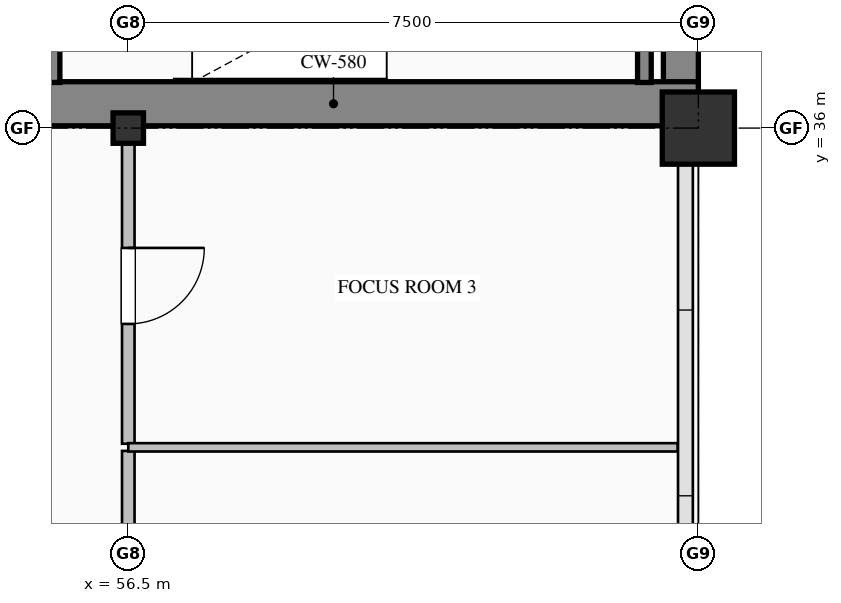
"""IFC4 building model, lengths in metres.
Left out: names, types, materials, properties, quantities, classifications, styles, units other than length and angle.
Written with IfcOpenShell. Run it as: python <this file> out.ifc"""

import sys

from ifc_helpers import new_model, si_unit, direction, frame, frame_2d, origin, origin_2d, place, context, subcontext, project, spatial, rectangle, hollow_rectangle, i_section, extrude, element, fill, save


model = new_model("IFC4")
c1 = context("Model", 3, precision=1e-05, world=origin(), true_north=direction((0.0, 1.0)))
c2 = subcontext(c1, "Body", "Model", "MODEL_VIEW")
j1 = project(units=[si_unit("LENGTHUNIT", "METRE"), si_unit("PLANEANGLEUNIT", "RADIAN")], contexts=[c1])
p1 = place(None, origin())
s1 = spatial("IfcSite", under=j1, at=p1, CompositionType="ELEMENT")
p2 = place(p1, origin())
s2 = spatial("IfcBuilding", under=s1, at=p2, CompositionType="ELEMENT")
p3 = place(p2, frame((0.0, 0.0, 213.8)))
s3 = spatial("IfcBuildingStorey", under=s2, at=p3, CompositionType="ELEMENT", Elevation=213.8)
p4 = place(p3, frame((63.77, 36.32, 0.0), z_axis=(0.0, 0.0, 1.0), x_axis=(0.0, 1.0, 0.0)))
e1 = element("IfcWall", 1, at=p4, inside=s3, PredefinedType="SHEAR", context=c2, shape_type="SweptSolid", body=[
    extrude(rectangle(XDim=15.22, YDim=0.46, at=frame_2d((7.61, 0.0))), origin(), (0.0, 0.0, 1.0), 3.775),
])
p5 = place(p3, frame((54.4, 36.32, 0.0), z_axis=(0.0, 0.0, 1.0), x_axis=(1.0, 0.0, 0.0)))
e2 = element("IfcWall", 2, at=p5, inside=s3, PredefinedType="SHEAR", context=c2, shape_type="SweptSolid", body=[
    extrude(rectangle(XDim=9.6, YDim=0.58, at=frame_2d((4.8, 0.0))), origin(), (0.0, 0.0, 1.0), 4.0),
])
p6 = place(p3, frame((56.5, 36.0, 0.0), z_axis=(0.0, 0.0, 1.0), x_axis=(1.0, 0.0, 0.0)))
e3 = element("IfcColumn", 3, at=p6, inside=s3, PredefinedType="COLUMN", context=c2, shape_type="SweptSolid", body=[
    extrude(i_section(OverallWidth=0.4, OverallDepth=0.4, WebThickness=0.013, FlangeThickness=0.021, FilletRadius=0.022, at=origin_2d()), origin(), (0.0, 0.0, 1.0), 4.0),
])
p7 = place(p3, frame((64.0, 36.0, 0.0), z_axis=(0.0, 0.0, 1.0), x_axis=(1.0, 0.0, 0.0)))
e4 = element("IfcColumn", 4, at=p7, inside=s3, PredefinedType="COLUMN", context=c2, shape_type="SweptSolid", body=[
    extrude(hollow_rectangle(XDim=0.95, YDim=0.95, WallThickness=0.036, at=origin_2d()), origin(), (0.0, 0.0, 1.0), 4.0),
])
p8 = place(p3, frame((55.48, 39.75, 0.0), z_axis=(0.0, 0.0, 1.0), x_axis=(0.0, -1.0, 0.0)))
e5 = element("IfcWall", 5, at=p8, inside=s3, PredefinedType="SOLIDWALL", context=c2, shape_type="SweptSolid", body=[
    extrude(rectangle(XDim=3.15, YDim=0.24, at=frame_2d((1.575, 0.0))), origin(), (0.0, 0.0, 1.0), 4.0),
])
p9 = place(p8, frame((1.0, 0.0, 0.0)))
e6 = element("IfcOpeningElement", 6, at=p9, cuts=e5, PredefinedType="OPENING", context=c2, shape_type="SweptSolid", body=[
    extrude(rectangle(XDim=1.15, YDim=2.2, at=frame_2d((0.575, 1.1))), frame((0.0, 0.13, 0.0), z_axis=(0.0, -1.0, 0.0), x_axis=(1.0, 0.0, 0.0)), (0.0, 0.0, 1.0), 0.26),
])
p10 = place(p3, frame((63.29, 36.6, 0.0), z_axis=(0.0, 0.0, 1.0), x_axis=(0.0, 1.0, 0.0)))
e7 = element("IfcWall", 7, at=p10, inside=s3, PredefinedType="SOLIDWALL", context=c2, shape_type="SweptSolid", body=[
    extrude(rectangle(XDim=3.15, YDim=0.18, at=frame_2d((1.575, 0.0))), origin(), (0.0, 0.0, 1.0), 4.0),
])
p11 = place(p3, frame((56.5, 31.753, 0.0), z_axis=(0.0, 0.0, 1.0), x_axis=(0.0, -1.0, 0.0)))
e8 = element("IfcWall", 8, at=p11, inside=s3, PredefinedType="PARTITIONING", context=c2, shape_type="SweptSolid", body=[
    extrude(rectangle(XDim=1.278, YDim=0.165, at=frame_2d((0.639, 0.0))), origin(), (0.0, 0.0, 1.0), 3.179),
])
p12 = place(p3, frame((56.5, 36.0, 0.0), z_axis=(0.0, 0.0, 1.0), x_axis=(0.0, -1.0, 0.0)))
e9 = element("IfcWall", 9, at=p12, inside=s3, PredefinedType="PARTITIONING", context=c2, shape_type="SweptSolid", body=[
    extrude(rectangle(XDim=4.153, YDim=0.165, at=frame_2d((2.077, 0.0))), origin(), (0.0, 0.0, 1.0), 3.179),
])
p13 = place(p12, frame((1.576, 0.0, 0.0)))
e10 = element("IfcOpeningElement", 10, at=p13, cuts=e9, PredefinedType="OPENING", context=c2, shape_type="SweptSolid", body=[
    extrude(rectangle(XDim=1.0, YDim=2.15, at=frame_2d((0.5, 1.075))), frame((0.0, 0.093, 0.0), z_axis=(0.0, -1.0, 0.0), x_axis=(1.0, 0.0, 0.0)), (0.0, 0.0, 1.0), 0.185),
])
p14 = place(p3, frame((56.5, 31.8, 0.0), z_axis=(0.0, 0.0, 1.0), x_axis=(1.0, 0.0, 0.0)))
e11 = element("IfcWall", 11, at=p14, inside=s3, PredefinedType="MOVABLE", context=c2, shape_type="SweptSolid", body=[
    extrude(rectangle(XDim=7.228, YDim=0.11, at=frame_2d((3.614, 0.0))), origin(), (0.0, 0.0, 1.0), 3.775),
])
p15 = place(p13, origin())
e12 = element("IfcDoor", 12, at=p15, inside=s3, OperationType="SINGLE_SWING_LEFT", PredefinedType="DOOR", context=c2, shape_type="SweptSolid", body=[
    extrude(rectangle(XDim=1.0, YDim=2.15, at=frame_2d((0.5, 1.075))), frame((0.0, 0.025, 0.0), z_axis=(0.0, -1.0, 0.0), x_axis=(1.0, 0.0, 0.0)), (0.0, 0.0, 1.0), 0.05),
])
fill(e10, e12)
save(model, sys.argv[1])
